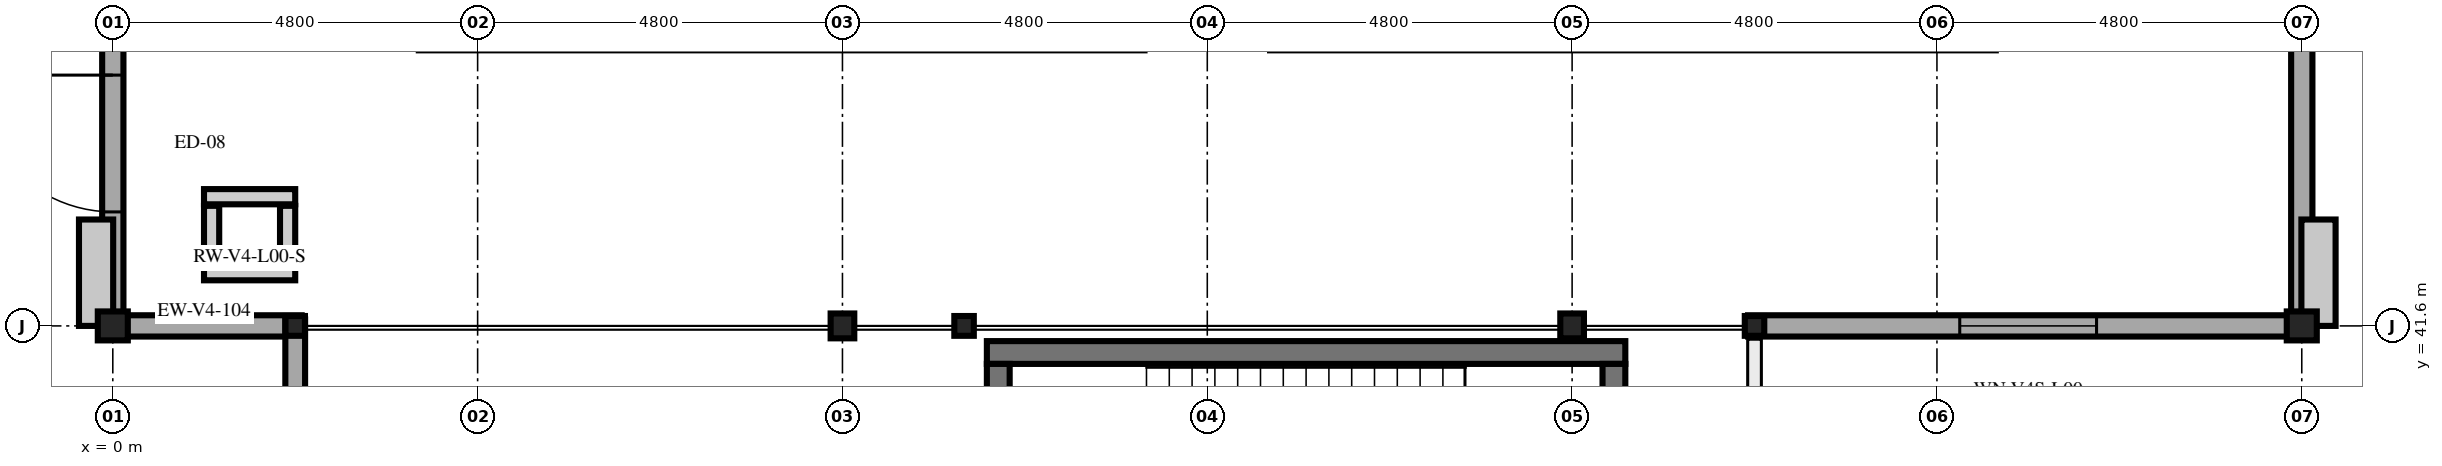
"""IFC4 building model, lengths in metres.
Left out: names, types, materials, properties, quantities, classifications, styles, units other than length and angle.
Written with IfcOpenShell. Run it as: python <this file> out.ifc"""

import sys

from ifc_helpers import new_model, si_unit, direction, frame, frame_2d, origin, origin_2d, place, context, subcontext, project, spatial, rectangle, i_section, extrude, element, fill, save


model = new_model("IFC4")
c1 = context("Model", 3, precision=1e-05, world=origin(), true_north=direction((0.0, 1.0)))
c2 = subcontext(c1, "Body", "Model", "MODEL_VIEW")
j1 = project(units=[si_unit("LENGTHUNIT", "METRE"), si_unit("PLANEANGLEUNIT", "RADIAN")], contexts=[c1])
p1 = place(None, origin())
s1 = spatial("IfcSite", under=j1, at=p1, CompositionType="ELEMENT")
p2 = place(p1, origin())
s2 = spatial("IfcBuilding", under=s1, at=p2, CompositionType="ELEMENT")
p3 = place(p2, origin())
s3 = spatial("IfcBuildingStorey", under=s2, at=p3, CompositionType="ELEMENT", Elevation=0.0)
for number, where, z_axis, x_axis in (
    (1, (0.0, 41.6, 0.0), (0.0, 0.0, 1.0), (1.0, 0.0, 0.0)),
    (2, (28.8, 41.6, 0.0), (0.0, 0.0, 1.0), (1.0, 0.0, 0.0)),
):
    element("IfcColumn", number, at=place(p3, frame(where, z_axis=z_axis, x_axis=x_axis)), inside=s3, PredefinedType="COLUMN", context=c2, shape_type="SweptSolid", body=[
        extrude(i_section(OverallWidth=0.395, OverallDepth=0.381, WebThickness=0.018, FlangeThickness=0.03, at=origin_2d()), origin(), (0.0, 0.0, 1.0), 5.1),
    ])
for number, where, z_axis, x_axis in (
    (3, (9.6, 41.6, 0.0), (0.0, 0.0, 1.0), (1.0, 0.0, 0.0)),
    (4, (19.2, 41.6, 0.0), (0.0, 0.0, 1.0), (1.0, 0.0, 0.0)),
):
    element("IfcColumn", number, at=place(p3, frame(where, z_axis=z_axis, x_axis=x_axis)), inside=s3, PredefinedType="COLUMN", context=c2, shape_type="SweptSolid", body=[
        extrude(i_section(OverallWidth=0.311, OverallDepth=0.327, WebThickness=0.016, FlangeThickness=0.025, at=origin_2d()), origin(), (0.0, 0.0, 1.0), 5.1),
    ])
for number, where, z_axis, x_axis in (
    (5, (2.4, 41.6, 0.0), (0.0, 0.0, 1.0), (1.0, 0.0, 0.0)),
    (6, (11.2, 41.6, 0.0), (0.0, 0.0, 1.0), (1.0, 0.0, 0.0)),
    (7, (21.6, 41.6, 0.0), (0.0, 0.0, 1.0), (1.0, 0.0, 0.0)),
):
    element("IfcColumn", number, at=place(p3, frame(where, z_axis=z_axis, x_axis=x_axis)), inside=s3, PredefinedType="COLUMN", context=c2, shape_type="SweptSolid", body=[
        extrude(i_section(OverallWidth=0.256, OverallDepth=0.26, WebThickness=0.01, FlangeThickness=0.017, at=origin_2d()), origin(), (0.0, 0.0, 1.0), 5.1),
    ])
p4 = place(p3, frame((11.5, 41.25, 0.0), z_axis=(0.0, 0.0, 1.0), x_axis=(1.0, 0.0, 0.0)))
e8 = element("IfcWall", 8, at=p4, inside=s3, PredefinedType="SHEAR", context=c2, shape_type="SweptSolid", body=[
    extrude(rectangle(XDim=8.4, YDim=0.3, at=frame_2d((4.2, 0.0))), origin(), (0.0, 0.0, 1.0), 4.88),
])
p5 = place(p3, frame((11.65, 37.3, 0.0), z_axis=(0.0, 0.0, 1.0), x_axis=(0.0, 1.0, 0.0)))
e9 = element("IfcWall", 9, at=p5, inside=s3, PredefinedType="SHEAR", context=c2, shape_type="SweptSolid", body=[
    extrude(rectangle(XDim=3.8, YDim=0.3, at=frame_2d((1.9, 0.0))), origin(), (0.0, 0.0, 1.0), 4.88),
])
p6 = place(p5, frame((1.35, 0.0, 0.0)))
e10 = element("IfcOpeningElement", 10, at=p6, cuts=e9, PredefinedType="OPENING", context=c2, shape_type="SweptSolid", body=[
    extrude(rectangle(XDim=1.1, YDim=2.2, at=frame_2d((0.55, 1.1))), frame((0.0, 0.16, 0.0), z_axis=(0.0, -1.0, 0.0), x_axis=(1.0, 0.0, 0.0)), (0.0, 0.0, 1.0), 0.32),
])
p7 = place(p3, frame((19.75, 41.1, 0.0), z_axis=(0.0, 0.0, 1.0), x_axis=(0.0, -1.0, 0.0)))
e11 = element("IfcWall", 11, at=p7, inside=s3, PredefinedType="SHEAR", context=c2, shape_type="SweptSolid", body=[
    extrude(rectangle(XDim=3.8, YDim=0.3, at=frame_2d((1.9, 0.0))), origin(), (0.0, 0.0, 1.0), 4.88),
])
for number, where, z_axis, x_axis in (
    (12, (2.4, 42.3, 0.0), (0.0, 0.0, 1.0), (-1.0, 0.0, 0.0)),
    (13, (1.2, 43.3, 0.0), (0.0, 0.0, 1.0), (1.0, 0.0, 0.0)),
):
    element("IfcWall", number, at=place(p3, frame(where, z_axis=z_axis, x_axis=x_axis)), inside=s3, PredefinedType="PARTITIONING", context=c2, shape_type="SweptSolid", body=[
        extrude(rectangle(XDim=1.2, YDim=0.2, at=frame_2d((0.6, 0.0))), origin(), (0.0, 0.0, 1.0), 4.38),
    ])
for number, where, z_axis, x_axis in (
    (14, (1.3, 42.42, 0.0), (0.0, 0.0, 1.0), (0.0, 1.0, 0.0)),
    (15, (2.3, 43.18, 0.0), (0.0, 0.0, 1.0), (0.0, -1.0, 0.0)),
):
    element("IfcWall", number, at=place(p3, frame(where, z_axis=z_axis, x_axis=x_axis)), inside=s3, PredefinedType="PARTITIONING", context=c2, shape_type="SweptSolid", body=[
        extrude(rectangle(XDim=0.76, YDim=0.2, at=frame_2d((0.38, 0.0))), origin(), (0.0, 0.0, 1.0), 4.38),
    ])
p8 = place(p3, frame((2.485, 41.6, 0.0), z_axis=(0.0, 0.0, 1.0), x_axis=(-1.0, 0.0, 0.0)))
e16 = element("IfcWall", 16, at=p8, inside=s3, PredefinedType="SOLIDWALL", context=c2, shape_type="SweptSolid", body=[
    extrude(rectangle(XDim=2.57, YDim=0.28, at=frame_2d((1.285, 0.0))), origin(), (0.0, 0.0, 1.0), 4.322),
])
p9 = place(p3, frame((28.885, 41.6, 0.0), z_axis=(0.0, 0.0, 1.0), x_axis=(-1.0, 0.0, 0.0)))
e17 = element("IfcWall", 17, at=p9, inside=s3, PredefinedType="SOLIDWALL", context=c2, shape_type="SweptSolid", body=[
    extrude(rectangle(XDim=7.37, YDim=0.28, at=frame_2d((3.685, 0.0))), origin(), (0.0, 0.0, 1.0), 4.322),
])
p10 = place(p9, frame((2.785, 0.0, 1.0)))
e18 = element("IfcOpeningElement", 18, at=p10, cuts=e17, PredefinedType="OPENING", context=c2, shape_type="SweptSolid", body=[
    extrude(rectangle(XDim=1.8, YDim=2.1, at=frame_2d((0.9, 1.05))), frame((0.0, 0.15, 0.0), z_axis=(0.0, -1.0, 0.0), x_axis=(1.0, 0.0, 0.0)), (0.0, 0.0, 1.0), 0.3),
])
p11 = place(p3, frame((0.0, 41.515, 0.0), z_axis=(0.0, 0.0, 1.0), x_axis=(0.0, 1.0, 0.0)))
e19 = element("IfcWall", 19, at=p11, inside=s3, PredefinedType="SOLIDWALL", context=c2, shape_type="SweptSolid", body=[
    extrude(rectangle(XDim=4.97, YDim=0.28, at=frame_2d((2.485, 0.0))), origin(), (0.0, 0.0, 1.0), 4.322),
])
p12 = place(p11, frame((1.585, 0.0, 0.0)))
e20 = element("IfcOpeningElement", 20, at=p12, cuts=e19, PredefinedType="OPENING", context=c2, shape_type="SweptSolid", body=[
    extrude(rectangle(XDim=1.8, YDim=2.4, at=frame_2d((0.9, 1.2))), frame((0.0, 0.15, 0.0), z_axis=(0.0, -1.0, 0.0), x_axis=(1.0, 0.0, 0.0)), (0.0, 0.0, 1.0), 0.3),
])
p13 = place(p3, frame((28.8, 46.485, 0.0), z_axis=(0.0, 0.0, 1.0), x_axis=(0.0, -1.0, 0.0)))
e21 = element("IfcWall", 21, at=p13, inside=s3, PredefinedType="SOLIDWALL", context=c2, shape_type="SweptSolid", body=[
    extrude(rectangle(XDim=4.97, YDim=0.28, at=frame_2d((2.485, 0.0))), origin(), (0.0, 0.0, 1.0), 4.322),
])
p14 = place(p3, frame((2.4, 36.715, 0.0), z_axis=(0.0, 0.0, 1.0), x_axis=(0.0, 1.0, 0.0)))
e22 = element("IfcWall", 22, at=p14, inside=s3, PredefinedType="SOLIDWALL", context=c2, shape_type="SweptSolid", body=[
    extrude(rectangle(XDim=4.97, YDim=0.26, at=frame_2d((2.485, 0.0))), origin(), (0.0, 0.0, 1.0), 4.305),
])
p15 = place(p14, frame((1.585, 0.0, 0.0)))
e23 = element("IfcOpeningElement", 23, at=p15, cuts=e22, PredefinedType="OPENING", context=c2, shape_type="SweptSolid", body=[
    extrude(rectangle(XDim=1.8, YDim=2.4, at=frame_2d((0.9, 1.2))), frame((0.0, 0.14, 0.0), z_axis=(0.0, -1.0, 0.0), x_axis=(1.0, 0.0, 0.0)), (0.0, 0.0, 1.0), 0.28),
])
p16 = place(p10, origin())
e24 = element("IfcWindow", 24, at=p16, inside=s3, PartitioningType="SINGLE_PANEL", PredefinedType="WINDOW", context=c2, shape_type="SweptSolid", body=[
    extrude(rectangle(XDim=1.8, YDim=2.1, at=frame_2d((0.9, 1.05))), frame((0.0, 0.03, 0.0), z_axis=(0.0, -1.0, 0.0), x_axis=(1.0, 0.0, 0.0)), (0.0, 0.0, 1.0), 0.06),
])
fill(e18, e24)
p17 = place(p12, origin())
e25 = element("IfcDoor", 25, at=p17, inside=s3, OperationType="SINGLE_SWING_RIGHT", PredefinedType="DOOR", context=c2, shape_type="SweptSolid", body=[
    extrude(rectangle(XDim=1.8, YDim=2.4, at=frame_2d((0.9, 1.2))), frame((0.0, 0.025, 0.0), z_axis=(0.0, -1.0, 0.0), x_axis=(1.0, 0.0, 0.0)), (0.0, 0.0, 1.0), 0.05),
])
fill(e20, e25)
save(model, sys.argv[1])
